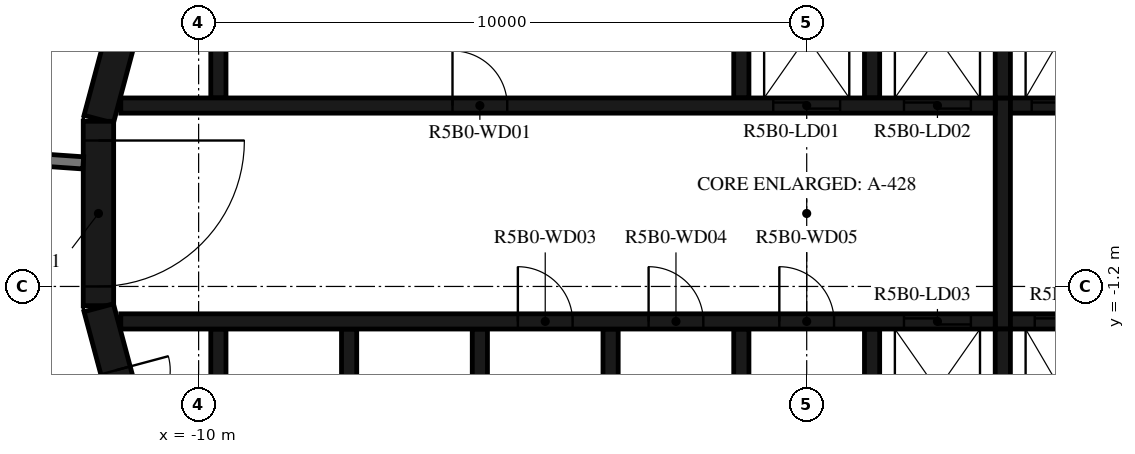
"""IFC4 building model, lengths in metres.
Left out: names, types, materials, properties, quantities, classifications, styles, units other than length and angle.
Written with IfcOpenShell. Run it as: python <this file> out.ifc"""

import sys

from ifc_helpers import new_model, si_unit, direction, frame, frame_2d, origin, place, context, subcontext, project, spatial, polyline, rectangle, outline, extrude, element, fill, save


model = new_model("IFC4")
c1 = context("Model", 3, precision=1e-05, world=origin(), true_north=direction((0.0, 1.0)))
c2 = subcontext(c1, "Body", "Model", "MODEL_VIEW")
j1 = project(units=[si_unit("LENGTHUNIT", "METRE"), si_unit("PLANEANGLEUNIT", "RADIAN")], contexts=[c1])
p1 = place(None, origin())
s1 = spatial("IfcSite", under=j1, at=p1, CompositionType="ELEMENT")
p2 = place(p1, origin())
s2 = spatial("IfcBuilding", under=s1, at=p2, CompositionType="ELEMENT")
p3 = place(p2, frame((0.0, 0.0, 202.4)))
s3 = spatial("IfcBuildingStorey", under=s2, at=p3, CompositionType="ELEMENT", Elevation=202.4)
p4 = place(p3, frame((-10.858, 4.479, 0.0), z_axis=(0.0, 0.0, 1.0), x_axis=(-0.258734743916, -0.965948410781, 0.0)))
e1 = element("IfcWall", 1, at=p4, inside=s3, PredefinedType="SHEAR", context=c2, shape_type="SweptSolid", body=[
    extrude(rectangle(XDim=3.033, YDim=0.5, at=frame_2d((1.516, 0.0))), origin(), (0.0, 0.0, 1.0), 3.12),
])
p5 = place(p3, frame((-11.647, 1.516, 0.0), z_axis=(0.0, 0.0, 1.0), x_axis=(0.0, -1.0, 0.0)))
e2 = element("IfcWall", 2, at=p5, inside=s3, PredefinedType="SHEAR", context=c2, shape_type="SweptSolid", body=[
    extrude(rectangle(XDim=3.033, YDim=0.5, at=frame_2d((1.516, 0.0))), origin(), (0.0, 0.0, 1.0), 3.12),
])
p6 = place(p5, frame((0.316, 0.0, 0.0)))
e3 = element("IfcOpeningElement", 3, at=p6, cuts=e2, PredefinedType="OPENING", context=c2, shape_type="SweptSolid", body=[
    extrude(rectangle(XDim=2.4, YDim=2.1, at=frame_2d((1.2, 1.05))), frame((0.0, 0.26, 0.0), z_axis=(0.0, -1.0, 0.0), x_axis=(1.0, 0.0, 0.0)), (0.0, 0.0, 1.0), 0.52),
])
p7 = place(p3, frame((-11.643, -1.55, 0.0), z_axis=(0.0, 0.0, 1.0), x_axis=(0.258734743916, -0.965948410781, 0.0)))
e4 = element("IfcWall", 4, at=p7, inside=s3, PredefinedType="SHEAR", context=c2, shape_type="SweptSolid", body=[
    extrude(rectangle(XDim=3.033, YDim=0.5, at=frame_2d((1.516, 0.0))), origin(), (0.0, 0.0, 1.0), 3.12),
])
p8 = place(p7, frame((1.066, 0.0, 0.0)))
e5 = element("IfcOpeningElement", 5, at=p8, cuts=e4, PredefinedType="OPENING", context=c2, shape_type="SweptSolid", body=[
    extrude(rectangle(XDim=0.9, YDim=2.1, at=frame_2d((0.45, 1.05))), frame((0.0, 0.26, 0.0), z_axis=(0.0, -1.0, 0.0), x_axis=(1.0, 0.0, 0.0)), (0.0, 0.0, 1.0), 0.52),
])
p9 = place(p3, origin())
e6 = element("IfcWall", 6, at=p9, inside=s3, PredefinedType="SHEAR", context=c2, shape_type="SweptSolid", body=[
    extrude(outline(polyline([(-9.55, 4.8), (-1.2, 4.8), (-1.2, 1.9), (-0.95, 1.9), (-0.95, 4.8), (0.95, 4.8), (0.95, 1.9), (1.2, 1.9), (1.2, 4.8), (3.1, 4.8), (3.1, 1.9), (3.35, 1.9), (3.35, 4.8), (5.25, 4.8), (5.25, 1.9), (5.5, 1.9), (5.5, 4.8), (7.4, 4.8), (7.4, 1.9), (7.65, 1.9), (7.65, 4.8), (9.55, 4.8), (9.55, 1.9), (9.8, 1.9), (9.8, 4.8), (9.8, 5.05), (-9.8, 5.05), (-9.8, 4.8), (-9.8, 1.9), (-9.55, 1.9), (-9.55, 4.8)])), origin(), (0.0, 0.0, 1.0), 3.12),
])
p10 = place(p3, origin())
e7 = element("IfcWall", 7, at=p10, inside=s3, PredefinedType="SHEAR", context=c2, shape_type="SweptSolid", body=[
    extrude(outline(polyline([(9.8, -5.05), (9.8, -4.8), (9.8, -1.9), (9.55, -1.9), (9.55, -4.8), (7.65, -4.8), (7.65, -1.9), (7.4, -1.9), (7.4, -4.8), (5.5, -4.8), (5.5, -1.9), (5.25, -1.9), (5.25, -4.8), (3.35, -4.8), (3.35, -1.9), (3.1, -1.9), (3.1, -4.8), (1.2, -4.8), (1.2, -1.9), (0.95, -1.9), (0.95, -4.8), (-0.95, -4.8), (-0.95, -1.9), (-1.2, -1.9), (-1.2, -4.8), (-3.1, -4.8), (-3.1, -1.9), (-3.35, -1.9), (-3.35, -4.8), (-5.25, -4.8), (-5.25, -1.9), (-5.5, -1.9), (-5.5, -4.8), (-7.4, -4.8), (-7.4, -1.9), (-7.65, -1.9), (-7.65, -4.8), (-9.55, -4.8), (-9.55, -1.9), (-9.8, -1.9), (-9.8, -4.8), (-9.8, -5.05), (9.8, -5.05)])), origin(), (0.0, 0.0, 1.0), 3.12),
])
p11 = place(p3, frame((-11.28, 1.775, 0.0), z_axis=(0.0, 0.0, 1.0), x_axis=(1.0, 0.0, 0.0)))
e8 = element("IfcWall", 8, at=p11, inside=s3, PredefinedType="SHEAR", context=c2, shape_type="SweptSolid", body=[
    extrude(rectangle(XDim=14.38, YDim=0.25, at=frame_2d((7.19, 0.0))), origin(), (0.0, 0.0, 1.0), 3.12),
])
p12 = place(p11, frame((10.73, 0.0, 0.0)))
e9 = element("IfcOpeningElement", 9, at=p12, cuts=e8, PredefinedType="OPENING", context=c2, shape_type="SweptSolid", body=[
    extrude(rectangle(XDim=1.1, YDim=2.1, at=frame_2d((0.55, 1.05))), frame((0.0, 0.135, 0.0), z_axis=(0.0, -1.0, 0.0), x_axis=(1.0, 0.0, 0.0)), (0.0, 0.0, 1.0), 0.27),
])
p13 = place(p11, frame((12.88, 0.0, 0.0)))
e10 = element("IfcOpeningElement", 10, at=p13, cuts=e8, PredefinedType="OPENING", context=c2, shape_type="SweptSolid", body=[
    extrude(rectangle(XDim=1.1, YDim=2.1, at=frame_2d((0.55, 1.05))), frame((0.0, 0.135, 0.0), z_axis=(0.0, -1.0, 0.0), x_axis=(1.0, 0.0, 0.0)), (0.0, 0.0, 1.0), 0.27),
])
p14 = place(p11, frame((5.455, 0.0, 0.0)))
e11 = element("IfcOpeningElement", 11, at=p14, cuts=e8, PredefinedType="OPENING", context=c2, shape_type="SweptSolid", body=[
    extrude(rectangle(XDim=0.9, YDim=2.1, at=frame_2d((0.45, 1.05))), frame((0.0, 0.135, 0.0), z_axis=(0.0, -1.0, 0.0), x_axis=(1.0, 0.0, 0.0)), (0.0, 0.0, 1.0), 0.27),
])
p15 = place(p3, frame((3.35, 1.775, 0.0), z_axis=(0.0, 0.0, 1.0), x_axis=(1.0, 0.0, 0.0)))
e12 = element("IfcWall", 12, at=p15, inside=s3, PredefinedType="SHEAR", context=c2, shape_type="SweptSolid", body=[
    extrude(rectangle(XDim=7.93, YDim=0.25, at=frame_2d((3.965, 0.0))), origin(), (0.0, 0.0, 1.0), 3.12),
])
p16 = place(p15, frame((0.35, 0.0, 0.0)))
e13 = element("IfcOpeningElement", 13, at=p16, cuts=e12, PredefinedType="OPENING", context=c2, shape_type="SweptSolid", body=[
    extrude(rectangle(XDim=1.2, YDim=2.4, at=frame_2d((0.6, 1.2))), frame((0.0, 0.135, 0.0), z_axis=(0.0, -1.0, 0.0), x_axis=(1.0, 0.0, 0.0)), (0.0, 0.0, 1.0), 0.27),
])
p17 = place(p15, frame((2.5, 0.0, 0.0)))
e14 = element("IfcOpeningElement", 14, at=p17, cuts=e12, PredefinedType="OPENING", context=c2, shape_type="SweptSolid", body=[
    extrude(rectangle(XDim=1.2, YDim=2.4, at=frame_2d((0.6, 1.2))), frame((0.0, 0.135, 0.0), z_axis=(0.0, -1.0, 0.0), x_axis=(1.0, 0.0, 0.0)), (0.0, 0.0, 1.0), 0.27),
])
p18 = place(p15, frame((4.8, 0.0, 0.0)))
e15 = element("IfcOpeningElement", 15, at=p18, cuts=e12, PredefinedType="OPENING", context=c2, shape_type="SweptSolid", body=[
    extrude(rectangle(XDim=0.9, YDim=2.1, at=frame_2d((0.45, 1.05))), frame((0.0, 0.135, 0.0), z_axis=(0.0, -1.0, 0.0), x_axis=(1.0, 0.0, 0.0)), (0.0, 0.0, 1.0), 0.27),
])
p19 = place(p3, frame((-11.28, -1.775, 0.0), z_axis=(0.0, 0.0, 1.0), x_axis=(1.0, 0.0, 0.0)))
e16 = element("IfcWall", 16, at=p19, inside=s3, PredefinedType="SHEAR", context=c2, shape_type="SweptSolid", body=[
    extrude(rectangle(XDim=14.38, YDim=0.25, at=frame_2d((7.19, 0.0))), origin(), (0.0, 0.0, 1.0), 3.12),
])
p20 = place(p19, frame((12.88, 0.0, 0.0)))
e17 = element("IfcOpeningElement", 17, at=p20, cuts=e16, PredefinedType="OPENING", context=c2, shape_type="SweptSolid", body=[
    extrude(rectangle(XDim=1.1, YDim=2.1, at=frame_2d((0.55, 1.05))), frame((0.0, 0.135, 0.0), z_axis=(0.0, -1.0, 0.0), x_axis=(1.0, 0.0, 0.0)), (0.0, 0.0, 1.0), 0.27),
])
p21 = place(p19, frame((6.53, 0.0, 0.0)))
e18 = element("IfcOpeningElement", 18, at=p21, cuts=e16, PredefinedType="OPENING", context=c2, shape_type="SweptSolid", body=[
    extrude(rectangle(XDim=0.9, YDim=2.1, at=frame_2d((0.45, 1.05))), frame((0.0, 0.135, 0.0), z_axis=(0.0, -1.0, 0.0), x_axis=(1.0, 0.0, 0.0)), (0.0, 0.0, 1.0), 0.27),
])
p22 = place(p19, frame((8.68, 0.0, 0.0)))
e19 = element("IfcOpeningElement", 19, at=p22, cuts=e16, PredefinedType="OPENING", context=c2, shape_type="SweptSolid", body=[
    extrude(rectangle(XDim=0.9, YDim=2.1, at=frame_2d((0.45, 1.05))), frame((0.0, 0.135, 0.0), z_axis=(0.0, -1.0, 0.0), x_axis=(1.0, 0.0, 0.0)), (0.0, 0.0, 1.0), 0.27),
])
p23 = place(p19, frame((10.83, 0.0, 0.0)))
e20 = element("IfcOpeningElement", 20, at=p23, cuts=e16, PredefinedType="OPENING", context=c2, shape_type="SweptSolid", body=[
    extrude(rectangle(XDim=0.9, YDim=2.1, at=frame_2d((0.45, 1.05))), frame((0.0, 0.135, 0.0), z_axis=(0.0, -1.0, 0.0), x_axis=(1.0, 0.0, 0.0)), (0.0, 0.0, 1.0), 0.27),
])
p24 = place(p3, frame((3.35, -1.775, 0.0), z_axis=(0.0, 0.0, 1.0), x_axis=(1.0, 0.0, 0.0)))
e21 = element("IfcWall", 21, at=p24, inside=s3, PredefinedType="SHEAR", context=c2, shape_type="SweptSolid", body=[
    extrude(rectangle(XDim=7.93, YDim=0.25, at=frame_2d((3.965, 0.0))), origin(), (0.0, 0.0, 1.0), 3.12),
])
p25 = place(p24, frame((0.4, 0.0, 0.0)))
e22 = element("IfcOpeningElement", 22, at=p25, cuts=e21, PredefinedType="OPENING", context=c2, shape_type="SweptSolid", body=[
    extrude(rectangle(XDim=1.1, YDim=2.4, at=frame_2d((0.55, 1.2))), frame((0.0, 0.135, 0.0), z_axis=(0.0, -1.0, 0.0), x_axis=(1.0, 0.0, 0.0)), (0.0, 0.0, 1.0), 0.27),
])
p26 = place(p24, frame((2.55, 0.0, 0.0)))
e23 = element("IfcOpeningElement", 23, at=p26, cuts=e21, PredefinedType="OPENING", context=c2, shape_type="SweptSolid", body=[
    extrude(rectangle(XDim=1.1, YDim=2.4, at=frame_2d((0.55, 1.2))), frame((0.0, 0.135, 0.0), z_axis=(0.0, -1.0, 0.0), x_axis=(1.0, 0.0, 0.0)), (0.0, 0.0, 1.0), 0.27),
])
p27 = place(p24, frame((4.7, 0.0, 0.0)))
e24 = element("IfcOpeningElement", 24, at=p27, cuts=e21, PredefinedType="OPENING", context=c2, shape_type="SweptSolid", body=[
    extrude(rectangle(XDim=1.1, YDim=2.4, at=frame_2d((0.55, 1.2))), frame((0.0, 0.135, 0.0), z_axis=(0.0, -1.0, 0.0), x_axis=(1.0, 0.0, 0.0)), (0.0, 0.0, 1.0), 0.27),
])
p28 = place(p3, frame((3.225, -1.9, 0.0), z_axis=(0.0, 0.0, 1.0), x_axis=(0.0, 1.0, 0.0)))
e25 = element("IfcWall", 25, at=p28, inside=s3, PredefinedType="SHEAR", context=c2, shape_type="SweptSolid", body=[
    extrude(rectangle(XDim=3.8, YDim=0.25, at=frame_2d((1.9, 0.0))), origin(), (0.0, 0.0, 1.0), 3.12),
])
p29 = place(p3, frame((-13.367, 0.935, 0.0), z_axis=(0.0, 0.0, 1.0), x_axis=(0.997553656289, -0.069904955655, 0.0)))
e26 = element("IfcWall", 26, at=p29, inside=s3, PredefinedType="STANDARD", context=c2, shape_type="SweptSolid", body=[
    extrude(rectangle(XDim=1.474, YDim=0.2, at=frame_2d((0.737, 0.0))), origin(), (0.0, 0.0, 1.0), 3.12),
])
p30 = place(p6, origin())
e27 = element("IfcDoor", 27, at=p30, inside=s3, OperationType="DOUBLE_DOOR_SINGLE_SWING", PredefinedType="DOOR", context=c2, shape_type="SweptSolid", body=[
    extrude(rectangle(XDim=2.4, YDim=2.1, at=frame_2d((1.2, 1.05))), frame((0.0, 0.025, 0.0), z_axis=(0.0, -1.0, 0.0), x_axis=(1.0, 0.0, 0.0)), (0.0, 0.0, 1.0), 0.05),
])
fill(e3, e27)
p31 = place(p12, origin())
e28 = element("IfcDoor", 28, at=p31, inside=s3, OperationType="DOUBLE_DOOR_SLIDING", PredefinedType="DOOR", context=c2, shape_type="SweptSolid", body=[
    extrude(rectangle(XDim=1.1, YDim=2.1, at=frame_2d((0.55, 1.05))), frame((0.0, 0.025, 0.0), z_axis=(0.0, -1.0, 0.0), x_axis=(1.0, 0.0, 0.0)), (0.0, 0.0, 1.0), 0.05),
])
fill(e9, e28)
p32 = place(p13, origin())
e29 = element("IfcDoor", 29, at=p32, inside=s3, OperationType="DOUBLE_DOOR_SLIDING", PredefinedType="DOOR", context=c2, shape_type="SweptSolid", body=[
    extrude(rectangle(XDim=1.1, YDim=2.1, at=frame_2d((0.55, 1.05))), frame((0.0, 0.025, 0.0), z_axis=(0.0, -1.0, 0.0), x_axis=(1.0, 0.0, 0.0)), (0.0, 0.0, 1.0), 0.05),
])
fill(e10, e29)
p33 = place(p16, origin())
e30 = element("IfcDoor", 30, at=p33, inside=s3, OperationType="DOUBLE_DOOR_SLIDING", PredefinedType="DOOR", context=c2, shape_type="SweptSolid", body=[
    extrude(rectangle(XDim=1.2, YDim=2.4, at=frame_2d((0.6, 1.2))), frame((0.0, 0.025, 0.0), z_axis=(0.0, -1.0, 0.0), x_axis=(1.0, 0.0, 0.0)), (0.0, 0.0, 1.0), 0.05),
])
fill(e13, e30)
p34 = place(p20, origin())
e31 = element("IfcDoor", 31, at=p34, inside=s3, OperationType="DOUBLE_DOOR_SLIDING", PredefinedType="DOOR", context=c2, shape_type="SweptSolid", body=[
    extrude(rectangle(XDim=1.1, YDim=2.1, at=frame_2d((0.55, 1.05))), frame((0.0, 0.025, 0.0), z_axis=(0.0, -1.0, 0.0), x_axis=(1.0, 0.0, 0.0)), (0.0, 0.0, 1.0), 0.05),
])
fill(e17, e31)
p35 = place(p25, origin())
e32 = element("IfcDoor", 32, at=p35, inside=s3, OperationType="DOUBLE_DOOR_SLIDING", PredefinedType="DOOR", context=c2, shape_type="SweptSolid", body=[
    extrude(rectangle(XDim=1.1, YDim=2.4, at=frame_2d((0.55, 1.2))), frame((0.0, 0.025, 0.0), z_axis=(0.0, -1.0, 0.0), x_axis=(1.0, 0.0, 0.0)), (0.0, 0.0, 1.0), 0.05),
])
fill(e22, e32)
p36 = place(p14, origin())
e33 = element("IfcDoor", 33, at=p36, inside=s3, OperationType="SINGLE_SWING_LEFT", PredefinedType="DOOR", context=c2, shape_type="SweptSolid", body=[
    extrude(rectangle(XDim=0.9, YDim=2.1, at=frame_2d((0.45, 1.05))), frame((0.0, 0.025, 0.0), z_axis=(0.0, -1.0, 0.0), x_axis=(1.0, 0.0, 0.0)), (0.0, 0.0, 1.0), 0.05),
])
fill(e11, e33)
p37 = place(p21, origin())
e34 = element("IfcDoor", 34, at=p37, inside=s3, OperationType="SINGLE_SWING_LEFT", PredefinedType="DOOR", context=c2, shape_type="SweptSolid", body=[
    extrude(rectangle(XDim=0.9, YDim=2.1, at=frame_2d((0.45, 1.05))), frame((0.0, 0.025, 0.0), z_axis=(0.0, -1.0, 0.0), x_axis=(1.0, 0.0, 0.0)), (0.0, 0.0, 1.0), 0.05),
])
fill(e18, e34)
p38 = place(p22, origin())
e35 = element("IfcDoor", 35, at=p38, inside=s3, OperationType="SINGLE_SWING_RIGHT", PredefinedType="DOOR", context=c2, shape_type="SweptSolid", body=[
    extrude(rectangle(XDim=0.9, YDim=2.1, at=frame_2d((0.45, 1.05))), frame((0.0, 0.025, 0.0), z_axis=(0.0, -1.0, 0.0), x_axis=(1.0, 0.0, 0.0)), (0.0, 0.0, 1.0), 0.05),
])
fill(e19, e35)
p39 = place(p23, origin())
e36 = element("IfcDoor", 36, at=p39, inside=s3, OperationType="SINGLE_SWING_LEFT", PredefinedType="DOOR", context=c2, shape_type="SweptSolid", body=[
    extrude(rectangle(XDim=0.9, YDim=2.1, at=frame_2d((0.45, 1.05))), frame((0.0, 0.025, 0.0), z_axis=(0.0, -1.0, 0.0), x_axis=(1.0, 0.0, 0.0)), (0.0, 0.0, 1.0), 0.05),
])
fill(e20, e36)
p40 = place(p8, origin())
e37 = element("IfcDoor", 37, at=p40, inside=s3, OperationType="SINGLE_SWING_RIGHT", PredefinedType="DOOR", context=c2, shape_type="SweptSolid", body=[
    extrude(rectangle(XDim=0.9, YDim=2.1, at=frame_2d((0.45, 1.05))), frame((0.0, 0.025, 0.0), z_axis=(0.0, -1.0, 0.0), x_axis=(1.0, 0.0, 0.0)), (0.0, 0.0, 1.0), 0.05),
])
fill(e5, e37)
save(model, sys.argv[1])
